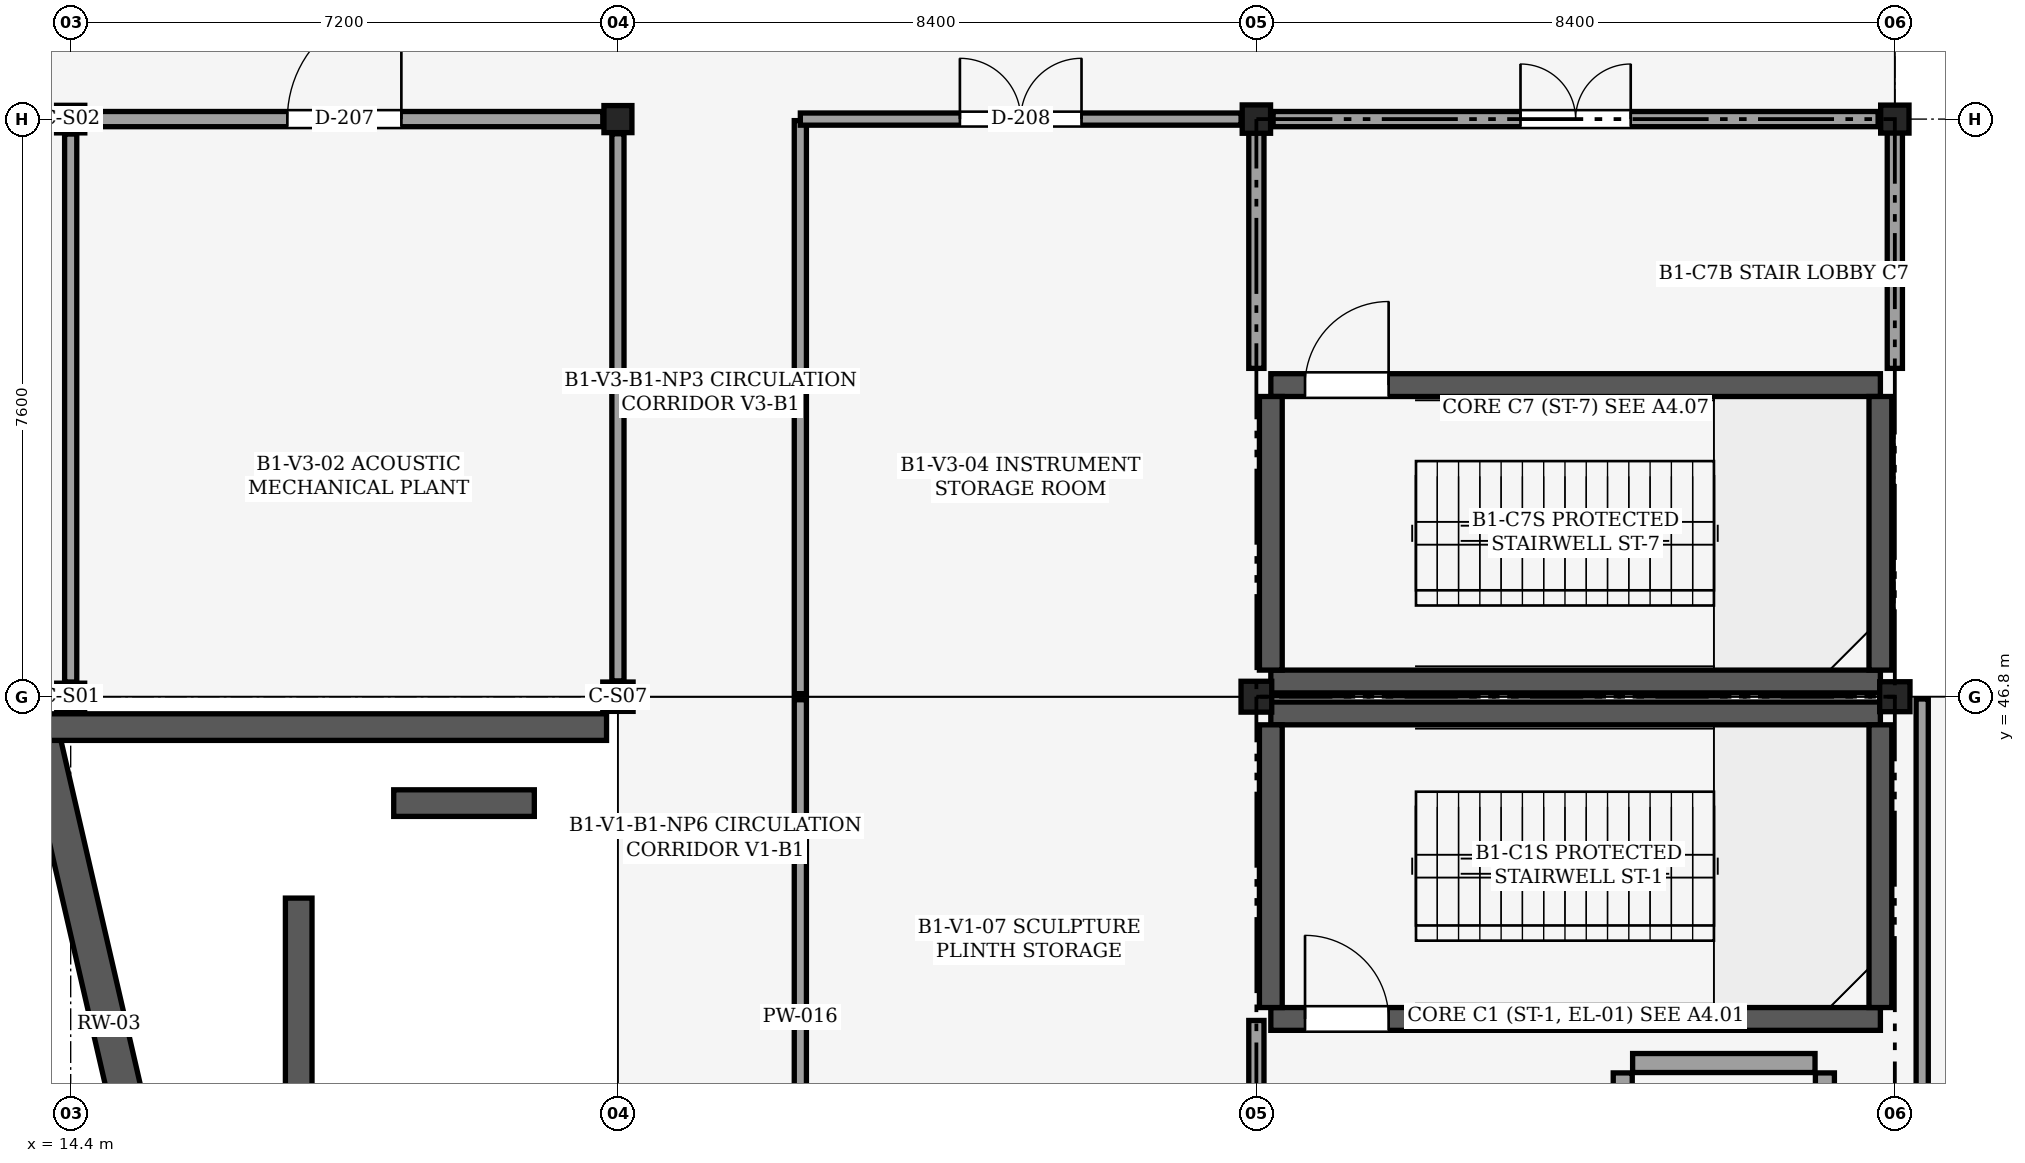
"""IFC4 building model, lengths in metres.
Left out: names, types, materials, properties, quantities, classifications, styles, units other than length and angle.
Written with IfcOpenShell. Run it as: python <this file> out.ifc"""

import sys

from ifc_helpers import new_model, si_unit, direction, frame, frame_2d, origin, origin_2d, place, context, subcontext, project, spatial, rectangle, i_section, extrude, element, fill, save


model = new_model("IFC4")
c1 = context("Model", 3, precision=1e-05, world=origin(), true_north=direction((0.0, 1.0)))
c2 = subcontext(c1, "Body", "Model", "MODEL_VIEW")
j1 = project(units=[si_unit("LENGTHUNIT", "METRE"), si_unit("PLANEANGLEUNIT", "RADIAN")], contexts=[c1])
p1 = place(None, origin())
s1 = spatial("IfcSite", under=j1, at=p1, CompositionType="ELEMENT")
p2 = place(p1, origin())
s2 = spatial("IfcBuilding", under=s1, at=p2, CompositionType="ELEMENT")
p3 = place(p2, frame((0.0, 0.0, -5.4)))
s3 = spatial("IfcBuildingStorey", under=s2, at=p3, CompositionType="ELEMENT", Elevation=-5.4)
p4 = place(p3, frame((14.4, 46.8, 0.0), z_axis=(0.0, 0.0, 1.0), x_axis=(1.0, 0.0, 0.0)))
e1 = element("IfcColumn", 1, at=p4, inside=s3, PredefinedType="COLUMN", context=c2, shape_type="SweptSolid", body=[
    extrude(i_section(OverallWidth=0.368, OverallDepth=0.356, WebThickness=0.011, FlangeThickness=0.018, FilletRadius=0.025, at=origin_2d()), origin(), (0.0, 0.0, 1.0), 5.4),
])
p5 = place(p3, frame((14.4, 54.4, 0.0), z_axis=(0.0, 0.0, 1.0), x_axis=(1.0, 0.0, 0.0)))
e2 = element("IfcColumn", 2, at=p5, inside=s3, PredefinedType="COLUMN", context=c2, shape_type="SweptSolid", body=[
    extrude(i_section(OverallWidth=0.371, OverallDepth=0.363, WebThickness=0.013, FlangeThickness=0.022, FilletRadius=0.025, at=origin_2d()), origin(), (0.0, 0.0, 1.0), 5.4),
])
p6 = place(p3, frame((21.6, 46.8, 0.0), z_axis=(0.0, 0.0, 1.0), x_axis=(1.0, 0.0, 0.0)))
e3 = element("IfcColumn", 3, at=p6, inside=s3, PredefinedType="COLUMN", context=c2, shape_type="SweptSolid", body=[
    extrude(i_section(OverallWidth=0.399, OverallDepth=0.386, WebThickness=0.021, FlangeThickness=0.033, FilletRadius=0.025, at=origin_2d()), origin(), (0.0, 0.0, 1.0), 5.4),
])
p7 = place(p3, frame((21.6, 54.4, 0.0), z_axis=(0.0, 0.0, 1.0), x_axis=(1.0, 0.0, 0.0)))
e4 = element("IfcColumn", 4, at=p7, inside=s3, PredefinedType="COLUMN", context=c2, shape_type="SweptSolid", body=[
    extrude(i_section(OverallWidth=0.368, OverallDepth=0.356, WebThickness=0.011, FlangeThickness=0.018, FilletRadius=0.025, at=origin_2d()), origin(), (0.0, 0.0, 1.0), 5.4),
])
p8 = place(p3, frame((30.0, 46.8, 0.0), z_axis=(0.0, 0.0, 1.0), x_axis=(1.0, 0.0, 0.0)))
e5 = element("IfcColumn", 5, at=p8, inside=s3, PredefinedType="COLUMN", context=c2, shape_type="SweptSolid", body=[
    extrude(i_section(OverallWidth=0.404, OverallDepth=0.406, WebThickness=0.027, FlangeThickness=0.044, FilletRadius=0.025, at=origin_2d()), origin(), (0.0, 0.0, 1.0), 5.4),
])
p9 = place(p3, frame((30.0, 54.4, 0.0), z_axis=(0.0, 0.0, 1.0), x_axis=(1.0, 0.0, 0.0)))
e6 = element("IfcColumn", 6, at=p9, inside=s3, PredefinedType="COLUMN", context=c2, shape_type="SweptSolid", body=[
    extrude(i_section(OverallWidth=0.373, OverallDepth=0.373, WebThickness=0.016, FlangeThickness=0.026, FilletRadius=0.025, at=origin_2d()), origin(), (0.0, 0.0, 1.0), 5.4),
])
p10 = place(p3, frame((38.4, 46.8, 0.0), z_axis=(0.0, 0.0, 1.0), x_axis=(1.0, 0.0, 0.0)))
e7 = element("IfcColumn", 7, at=p10, inside=s3, PredefinedType="COLUMN", context=c2, shape_type="SweptSolid", body=[
    extrude(i_section(OverallWidth=0.399, OverallDepth=0.394, WebThickness=0.023, FlangeThickness=0.037, FilletRadius=0.025, at=origin_2d()), origin(), (0.0, 0.0, 1.0), 5.4),
])
p11 = place(p3, frame((38.4, 54.4, 0.0), z_axis=(0.0, 0.0, 1.0), x_axis=(1.0, 0.0, 0.0)))
e8 = element("IfcColumn", 8, at=p11, inside=s3, PredefinedType="COLUMN", context=c2, shape_type="SweptSolid", body=[
    extrude(i_section(OverallWidth=0.373, OverallDepth=0.368, WebThickness=0.015, FlangeThickness=0.024, FilletRadius=0.025, at=origin_2d()), origin(), (0.0, 0.0, 1.0), 5.4),
])
p12 = place(p3, frame((18.65, 45.4, -0.45), z_axis=(0.0, 0.0, 1.0), x_axis=(1.0, 0.0, 0.0)))
e9 = element("IfcWall", 9, at=p12, inside=s3, PredefinedType="USERDEFINED", context=c2, shape_type="SweptSolid", body=[
    extrude(rectangle(XDim=1.85, YDim=0.35, at=frame_2d((0.925, 0.0))), origin(), (0.0, 0.0, 1.0), 5.6),
])
p13 = place(p3, frame((17.4, 36.25, -0.45), z_axis=(0.0, 0.0, 1.0), x_axis=(0.0, 1.0, 0.0)))
e10 = element("IfcWall", 10, at=p13, inside=s3, PredefinedType="USERDEFINED", context=c2, shape_type="SweptSolid", body=[
    extrude(rectangle(XDim=7.9, YDim=0.35, at=frame_2d((3.95, 0.0))), origin(), (0.0, 0.0, 1.0), 5.6),
])
p14 = place(p3, frame((14.005, 46.377, -0.45), z_axis=(0.0, 0.0, 1.0), x_axis=(0.224861740746, -0.974390680143, 0.0)))
e11 = element("IfcWall", 11, at=p14, inside=s3, PredefinedType="USERDEFINED", context=c2, shape_type="SweptSolid", body=[
    extrude(rectangle(XDim=7.981, YDim=0.45, at=frame_2d((3.991, 0.0))), origin(), (0.0, 0.0, 1.0), 5.6),
])
p15 = place(p3, frame((21.45, 46.4, -0.45), z_axis=(0.0, 0.0, 1.0), x_axis=(-1.0, 0.0, 0.0)))
e12 = element("IfcWall", 12, at=p15, inside=s3, PredefinedType="USERDEFINED", context=c2, shape_type="SweptSolid", body=[
    extrude(rectangle(XDim=7.45, YDim=0.35, at=frame_2d((3.725, 0.0))), origin(), (0.0, 0.0, 1.0), 5.6),
])
p16 = place(p3, frame((30.19, 42.56, 0.0), z_axis=(0.0, 0.0, 1.0), x_axis=(1.0, 0.0, 0.0)))
e13 = element("IfcWall", 13, at=p16, inside=s3, PredefinedType="SHEAR", context=c2, shape_type="SweptSolid", body=[
    extrude(rectangle(XDim=8.02, YDim=0.3, at=frame_2d((4.01, 0.0))), origin(), (0.0, 0.0, 1.0), 5.12),
])
p17 = place(p16, frame((0.45, 0.0, 0.0)))
e14 = element("IfcOpeningElement", 14, at=p17, cuts=e13, PredefinedType="OPENING", context=c2, shape_type="SweptSolid", body=[
    extrude(rectangle(XDim=1.1, YDim=2.15, at=frame_2d((0.55, 1.075))), frame((0.0, 0.16, 0.0), z_axis=(0.0, -1.0, 0.0), x_axis=(1.0, 0.0, 0.0)), (0.0, 0.0, 1.0), 0.321),
])
p18 = place(p3, frame((30.19, 46.58, 0.0), z_axis=(0.0, 0.0, 1.0), x_axis=(1.0, 0.0, 0.0)))
e15 = element("IfcWall", 15, at=p18, inside=s3, PredefinedType="SHEAR", context=c2, shape_type="SweptSolid", body=[
    extrude(rectangle(XDim=8.02, YDim=0.3, at=frame_2d((4.01, 0.0))), origin(), (0.0, 0.0, 1.0), 5.12),
])
for number, where, z_axis, x_axis in (
    (16, (30.19, 42.71, 0.0), (0.0, 0.0, 1.0), (0.0, 1.0, 0.0)),
    (17, (38.21, 42.71, 0.0), (0.0, 0.0, 1.0), (0.0, 1.0, 0.0)),
):
    element("IfcWall", number, at=place(p3, frame(where, z_axis=z_axis, x_axis=x_axis)), inside=s3, PredefinedType="SHEAR", context=c2, shape_type="SweptSolid", body=[
        extrude(rectangle(XDim=3.72, YDim=0.3, at=frame_2d((1.86, 0.0))), origin(), (0.0, 0.0, 1.0), 5.12),
    ])
p19 = place(p3, frame((37.48, 38.85, 0.0), z_axis=(0.0, 0.0, 1.0), x_axis=(0.0, 1.0, 0.0)))
e18 = element("IfcWall", 18, at=p19, inside=s3, PredefinedType="PARTITIONING", context=c2, shape_type="SweptSolid", body=[
    extrude(rectangle(XDim=3.0, YDim=0.25, at=frame_2d((1.5, 0.0))), origin(), (0.0, 0.0, 1.0), 5.12),
])
p20 = place(p3, frame((34.95, 41.98, 0.0), z_axis=(0.0, 0.0, 1.0), x_axis=(1.0, 0.0, 0.0)))
e19 = element("IfcWall", 19, at=p20, inside=s3, PredefinedType="PARTITIONING", context=c2, shape_type="SweptSolid", body=[
    extrude(rectangle(XDim=2.4, YDim=0.25, at=frame_2d((1.2, 0.0))), origin(), (0.0, 0.0, 1.0), 5.12),
])
p21 = place(p3, frame((34.82, 38.5, 0.0), z_axis=(0.0, 0.0, 1.0), x_axis=(0.0, 1.0, 0.0)))
e20 = element("IfcWall", 20, at=p21, inside=s3, PredefinedType="PARTITIONING", context=c2, shape_type="SweptSolid", body=[
    extrude(rectangle(XDim=3.35, YDim=0.25, at=frame_2d((1.675, 0.0))), origin(), (0.0, 0.0, 1.0), 5.12),
])
p22 = place(p21, frame((0.85, 0.0, 0.0)))
e21 = element("IfcOpeningElement", 21, at=p22, cuts=e20, PredefinedType="OPENING", context=c2, shape_type="SweptSolid", body=[
    extrude(rectangle(XDim=1.25, YDim=2.15, at=frame_2d((0.625, 1.075))), frame((0.0, 0.135, 0.0), z_axis=(0.0, -1.0, 0.0), x_axis=(1.0, 0.0, 0.0)), (0.0, 0.0, 1.0), 0.271),
])
p23 = place(p3, frame((30.0, 38.62, 0.0), z_axis=(0.0, 0.0, 1.0), x_axis=(0.0, 1.0, 0.0)))
e22 = element("IfcWall", 22, at=p23, inside=s3, PredefinedType="PARTITIONING", context=c2, shape_type="SweptSolid", body=[
    extrude(rectangle(XDim=3.92, YDim=0.2, at=frame_2d((1.96, 0.0))), origin(), (0.0, 0.0, 1.0), 4.173),
])
p24 = place(p3, frame((30.19, 47.0, 0.0), z_axis=(0.0, 0.0, 1.0), x_axis=(1.0, 0.0, 0.0)))
e23 = element("IfcWall", 23, at=p24, inside=s3, PredefinedType="SHEAR", context=c2, shape_type="SweptSolid", body=[
    extrude(rectangle(XDim=8.02, YDim=0.3, at=frame_2d((4.01, 0.0))), origin(), (0.0, 0.0, 1.0), 5.12),
])
p25 = place(p3, frame((30.19, 50.9, 0.0), z_axis=(0.0, 0.0, 1.0), x_axis=(1.0, 0.0, 0.0)))
e24 = element("IfcWall", 24, at=p25, inside=s3, PredefinedType="SHEAR", context=c2, shape_type="SweptSolid", body=[
    extrude(rectangle(XDim=8.02, YDim=0.3, at=frame_2d((4.01, 0.0))), origin(), (0.0, 0.0, 1.0), 5.12),
])
p26 = place(p25, frame((0.45, 0.0, 0.0)))
e25 = element("IfcOpeningElement", 25, at=p26, cuts=e24, PredefinedType="OPENING", context=c2, shape_type="SweptSolid", body=[
    extrude(rectangle(XDim=1.1, YDim=2.15, at=frame_2d((0.55, 1.075))), frame((0.0, 0.16, 0.0), z_axis=(0.0, -1.0, 0.0), x_axis=(1.0, 0.0, 0.0)), (0.0, 0.0, 1.0), 0.321),
])
for number, where, z_axis, x_axis in (
    (26, (30.19, 47.15, 0.0), (0.0, 0.0, 1.0), (0.0, 1.0, 0.0)),
    (27, (38.21, 47.15, 0.0), (0.0, 0.0, 1.0), (0.0, 1.0, 0.0)),
):
    element("IfcWall", number, at=place(p3, frame(where, z_axis=z_axis, x_axis=x_axis)), inside=s3, PredefinedType="SHEAR", context=c2, shape_type="SweptSolid", body=[
        extrude(rectangle(XDim=3.6, YDim=0.3, at=frame_2d((1.8, 0.0))), origin(), (0.0, 0.0, 1.0), 5.12),
    ])
p27 = place(p3, frame((30.0, 51.12, 0.0), z_axis=(0.0, 0.0, 1.0), x_axis=(0.0, 1.0, 0.0)))
e28 = element("IfcWall", 28, at=p27, inside=s3, PredefinedType="PARTITIONING", context=c2, shape_type="SweptSolid", body=[
    extrude(rectangle(XDim=3.26, YDim=0.2, at=frame_2d((1.63, 0.0))), origin(), (0.0, 0.0, 1.0), 4.638),
])
p28 = place(p3, frame((38.4, 51.12, 0.0), z_axis=(0.0, 0.0, 1.0), x_axis=(0.0, 1.0, 0.0)))
e29 = element("IfcWall", 29, at=p28, inside=s3, PredefinedType="PARTITIONING", context=c2, shape_type="SweptSolid", body=[
    extrude(rectangle(XDim=3.26, YDim=0.2, at=frame_2d((1.63, 0.0))), origin(), (0.0, 0.0, 1.0), 4.488),
])
p29 = place(p3, frame((30.22, 54.4, 0.0), z_axis=(0.0, 0.0, 1.0), x_axis=(1.0, 0.0, 0.0)))
e30 = element("IfcWall", 30, at=p29, inside=s3, PredefinedType="PARTITIONING", context=c2, shape_type="SweptSolid", body=[
    extrude(rectangle(XDim=7.96, YDim=0.2, at=frame_2d((3.98, 0.0))), origin(), (0.0, 0.0, 1.0), 4.407),
])
p30 = place(p29, frame((3.255, 0.0, 0.0)))
e31 = element("IfcOpeningElement", 31, at=p30, cuts=e30, PredefinedType="OPENING", context=c2, shape_type="SweptSolid", body=[
    extrude(rectangle(XDim=1.45, YDim=2.2, at=frame_2d((0.725, 1.1))), frame((0.0, 0.11, 0.0), z_axis=(0.0, -1.0, 0.0), x_axis=(1.0, 0.0, 0.0)), (0.0, 0.0, 1.0), 0.22),
])
p31 = place(p3, frame((24.0, 38.42, 0.0), z_axis=(0.0, 0.0, 1.0), x_axis=(0.0, 1.0, 0.0)))
e32 = element("IfcWall", 32, at=p31, inside=s3, PredefinedType="PARTITIONING", context=c2, shape_type="SweptSolid", body=[
    extrude(rectangle(XDim=8.34, YDim=0.16, at=frame_2d((4.17, 0.0))), origin(), (0.0, 0.0, 1.0), 5.1),
])
p32 = place(p3, frame((38.76, 38.41, 0.0), z_axis=(0.0, 0.0, 1.0), x_axis=(0.0, 1.0, 0.0)))
e33 = element("IfcWall", 33, at=p32, inside=s3, PredefinedType="PARTITIONING", context=c2, shape_type="SweptSolid", body=[
    extrude(rectangle(XDim=8.36, YDim=0.16, at=frame_2d((4.18, 0.0))), origin(), (0.0, 0.0, 1.0), 5.1),
])
p33 = place(p3, frame((7.402, 54.4, 0.0), z_axis=(0.0, 0.0, 1.0), x_axis=(1.0, 0.0, 0.0)))
e34 = element("IfcWall", 34, at=p33, inside=s3, PredefinedType="PARTITIONING", context=c2, shape_type="SweptSolid", body=[
    extrude(rectangle(XDim=6.798, YDim=0.16, at=frame_2d((3.399, 0.0))), origin(), (0.0, 0.0, 1.0), 4.551),
])
p34 = place(p33, frame((2.349, 0.0, 0.0)))
e35 = element("IfcOpeningElement", 35, at=p34, cuts=e34, PredefinedType="OPENING", context=c2, shape_type="SweptSolid", body=[
    extrude(rectangle(XDim=2.1, YDim=2.5, at=frame_2d((1.05, 1.25))), frame((0.0, 0.09, 0.0), z_axis=(0.0, -1.0, 0.0), x_axis=(1.0, 0.0, 0.0)), (0.0, 0.0, 1.0), 0.18),
])
p35 = place(p3, frame((14.4, 46.993, 0.0), z_axis=(0.0, 0.0, 1.0), x_axis=(0.0, 1.0, 0.0)))
e36 = element("IfcWall", 36, at=p35, inside=s3, PredefinedType="PARTITIONING", context=c2, shape_type="SweptSolid", body=[
    extrude(rectangle(XDim=7.211, YDim=0.16, at=frame_2d((3.605, 0.0))), origin(), (0.0, 0.0, 1.0), 4.493),
])
p36 = place(p3, frame((14.601, 54.4, 0.0), z_axis=(0.0, 0.0, 1.0), x_axis=(1.0, 0.0, 0.0)))
e37 = element("IfcWall", 37, at=p36, inside=s3, PredefinedType="PARTITIONING", context=c2, shape_type="SweptSolid", body=[
    extrude(rectangle(XDim=6.8, YDim=0.2, at=frame_2d((3.4, 0.0))), origin(), (0.0, 0.0, 1.0), 4.567),
])
p37 = place(p36, frame((2.65, 0.0, 0.0)))
e38 = element("IfcOpeningElement", 38, at=p37, cuts=e37, PredefinedType="OPENING", context=c2, shape_type="SweptSolid", body=[
    extrude(rectangle(XDim=1.5, YDim=2.2, at=frame_2d((0.75, 1.1))), frame((0.0, 0.11, 0.0), z_axis=(0.0, -1.0, 0.0), x_axis=(1.0, 0.0, 0.0)), (0.0, 0.0, 1.0), 0.22),
])
p38 = place(p3, frame((21.6, 47.008, 0.0), z_axis=(0.0, 0.0, 1.0), x_axis=(0.0, 1.0, 0.0)))
e39 = element("IfcWall", 39, at=p38, inside=s3, PredefinedType="PARTITIONING", context=c2, shape_type="SweptSolid", body=[
    extrude(rectangle(XDim=7.199, YDim=0.16, at=frame_2d((3.6, 0.0))), origin(), (0.0, 0.0, 1.0), 4.567),
])
p39 = place(p3, frame((24.0, 46.84, 0.0), z_axis=(0.0, 0.0, 1.0), x_axis=(0.0, 1.0, 0.0)))
e40 = element("IfcWall", 40, at=p39, inside=s3, PredefinedType="PARTITIONING", context=c2, shape_type="SweptSolid", body=[
    extrude(rectangle(XDim=7.54, YDim=0.16, at=frame_2d((3.77, 0.0))), origin(), (0.0, 0.0, 1.0), 5.1),
])
p40 = place(p3, frame((24.0, 54.4, 0.0), z_axis=(0.0, 0.0, 1.0), x_axis=(1.0, 0.0, 0.0)))
e41 = element("IfcWall", 41, at=p40, inside=s3, PredefinedType="PARTITIONING", context=c2, shape_type="SweptSolid", body=[
    extrude(rectangle(XDim=5.799, YDim=0.16, at=frame_2d((2.899, 0.0))), origin(), (0.0, 0.0, 1.0), 4.338),
])
p41 = place(p40, frame((2.099, 0.0, 0.0)))
e42 = element("IfcOpeningElement", 42, at=p41, cuts=e41, PredefinedType="OPENING", context=c2, shape_type="SweptSolid", body=[
    extrude(rectangle(XDim=1.6, YDim=2.35, at=frame_2d((0.8, 1.175))), frame((0.0, 0.09, 0.0), z_axis=(0.0, -1.0, 0.0), x_axis=(1.0, 0.0, 0.0)), (0.0, 0.0, 1.0), 0.18),
])
p42 = place(p17, origin())
e43 = element("IfcDoor", 43, at=p42, inside=s3, OperationType="SINGLE_SWING_LEFT", PredefinedType="DOOR", context=c2, shape_type="SweptSolid", body=[
    extrude(rectangle(XDim=1.1, YDim=2.15, at=frame_2d((0.55, 1.075))), frame((0.0, 0.025, 0.0), z_axis=(0.0, -1.0, 0.0), x_axis=(1.0, 0.0, 0.0)), (0.0, 0.0, 1.0), 0.05),
])
fill(e14, e43)
p43 = place(p26, origin())
e44 = element("IfcDoor", 44, at=p43, inside=s3, OperationType="SINGLE_SWING_RIGHT", PredefinedType="DOOR", context=c2, shape_type="SweptSolid", body=[
    extrude(rectangle(XDim=1.1, YDim=2.15, at=frame_2d((0.55, 1.075))), frame((0.0, 0.025, 0.0), z_axis=(0.0, -1.0, 0.0), x_axis=(1.0, 0.0, 0.0)), (0.0, 0.0, 1.0), 0.05),
])
fill(e25, e44)
p44 = place(p30, origin())
e45 = element("IfcDoor", 45, at=p44, inside=s3, OperationType="DOUBLE_DOOR_SINGLE_SWING", PredefinedType="DOOR", context=c2, shape_type="SweptSolid", body=[
    extrude(rectangle(XDim=1.45, YDim=2.2, at=frame_2d((0.725, 1.1))), frame((0.0, 0.025, 0.0), z_axis=(0.0, -1.0, 0.0), x_axis=(1.0, 0.0, 0.0)), (0.0, 0.0, 1.0), 0.05),
])
fill(e31, e45)
p45 = place(p37, origin())
e46 = element("IfcDoor", 46, at=p45, inside=s3, OperationType="SINGLE_SWING_RIGHT", PredefinedType="DOOR", context=c2, shape_type="SweptSolid", body=[
    extrude(rectangle(XDim=1.5, YDim=2.2, at=frame_2d((0.75, 1.1))), frame((0.0, 0.025, 0.0), z_axis=(0.0, -1.0, 0.0), x_axis=(1.0, 0.0, 0.0)), (0.0, 0.0, 1.0), 0.05),
])
fill(e38, e46)
p46 = place(p41, origin())
e47 = element("IfcDoor", 47, at=p46, inside=s3, OperationType="DOUBLE_DOOR_SINGLE_SWING", PredefinedType="DOOR", context=c2, shape_type="SweptSolid", body=[
    extrude(rectangle(XDim=1.6, YDim=2.35, at=frame_2d((0.8, 1.175))), frame((0.0, 0.025, 0.0), z_axis=(0.0, -1.0, 0.0), x_axis=(1.0, 0.0, 0.0)), (0.0, 0.0, 1.0), 0.05),
])
fill(e42, e47)
save(model, sys.argv[1])
